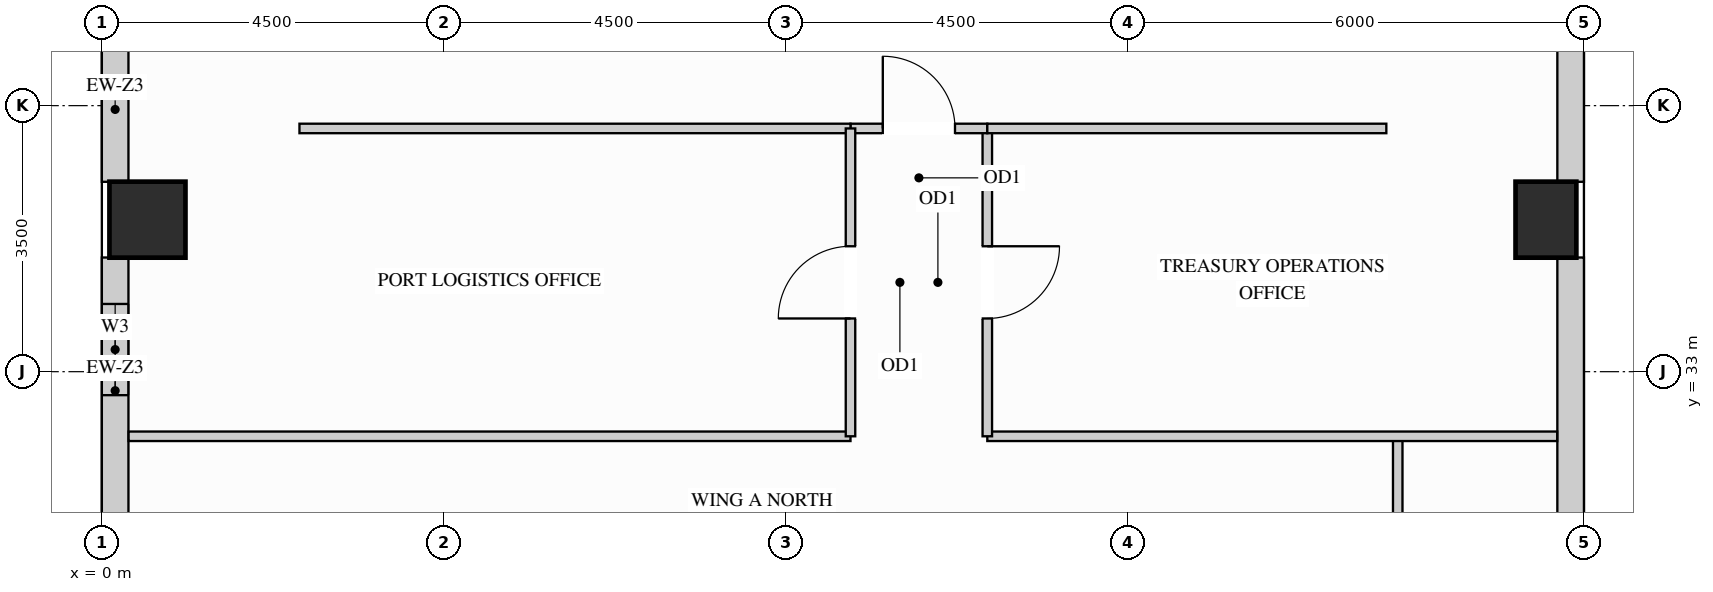
"""IFC4 building model, lengths in metres.
Left out: names, types, materials, properties, quantities, classifications, styles, units other than length and angle.
Written with IfcOpenShell. Run it as: python <this file> out.ifc"""

import sys

from ifc_helpers import new_model, si_unit, direction, frame, frame_2d, origin, origin_2d, place, context, subcontext, project, spatial, rectangle, extrude, source, transform, mapped, element, fill, save


model = new_model("IFC4")
c1 = context("Model", 3, precision=1e-05, world=origin(), true_north=direction((0.0, 1.0)))
c2 = subcontext(c1, "Body", "Model", "MODEL_VIEW")
j1 = project(units=[si_unit("LENGTHUNIT", "METRE"), si_unit("PLANEANGLEUNIT", "RADIAN")], contexts=[c1])
p1 = place(None, origin())
s1 = spatial("IfcSite", under=j1, at=p1, CompositionType="ELEMENT")
p2 = place(p1, origin())
s2 = spatial("IfcBuilding", under=s1, at=p2, CompositionType="ELEMENT")
p3 = place(p2, frame((0.0, 0.0, 164.7)))
s3 = spatial("IfcBuildingStorey", under=s2, at=p3, CompositionType="ELEMENT", Elevation=164.7)
m1 = source(origin(), c2, "Body", "SweptSolid", [
    extrude(rectangle(XDim=0.8, YDim=1.0, at=origin_2d()), origin(), (0.0, 0.0, 1.0), 3.4),
])
p4 = place(p3, frame((19.0, 35.0, 0.0), z_axis=(0.0, 0.0, 1.0), x_axis=(1.0, 0.0, 0.0)))
e1 = element("IfcColumn", 1, at=p4, inside=s3, PredefinedType="COLUMN", context=c2, shape_type="MappedRepresentation", body=[
    mapped(m1, transform((0.0, 0.0, 0.0), x_axis=(1.0, 0.0, 0.0), y_axis=(0.0, 1.0, 0.0), z_axis=(0.0, 0.0, 1.0))),
])
m2 = source(origin(), c2, "Body", "SweptSolid", [
    extrude(rectangle(XDim=1.0, YDim=1.0, at=origin_2d()), origin(), (0.0, 0.0, 1.0), 3.4),
])
p5 = place(p3, frame((0.6, 35.0, 0.0), z_axis=(0.0, 0.0, 1.0), x_axis=(1.0, 0.0, 0.0)))
e2 = element("IfcColumn", 2, at=p5, inside=s3, PredefinedType="COLUMN", context=c2, shape_type="MappedRepresentation", body=[
    mapped(m2, transform((0.0, 0.0, 0.0), x_axis=(1.0, 0.0, 0.0), y_axis=(0.0, 1.0, 0.0), z_axis=(0.0, 0.0, 1.0))),
])
m3 = source(origin(), c2, "Body", "SweptSolid", [
    extrude(rectangle(XDim=1.904, YDim=0.35, at=frame_2d((0.952, 0.0))), origin(), (0.0, 0.0, 1.0), 2.612),
])
p6 = place(p3, frame((0.175, 37.402, 0.0), z_axis=(0.0, 0.0, 1.0), x_axis=(0.0, -1.0, 0.0)))
e3 = element("IfcWall", 3, at=p6, inside=s3, PredefinedType="SOLIDWALL", context=c2, shape_type="MappedRepresentation", body=[
    mapped(m3, transform((0.0, 0.0, 0.0), x_axis=(1.0, 0.0, 0.0), y_axis=(0.0, 1.0, 0.0), z_axis=(0.0, 0.0, 1.0))),
])
p7 = place(p3, frame((0.175, 34.502, 0.0), z_axis=(0.0, 0.0, 1.0), x_axis=(0.0, -1.0, 0.0)))
e4 = element("IfcWall", 4, at=p7, inside=s3, PredefinedType="SOLIDWALL", context=c2, shape_type="SweptSolid", body=[
    extrude(rectangle(XDim=3.504, YDim=0.35, at=frame_2d((1.752, 0.0))), origin(), (0.0, 0.0, 1.0), 2.612),
])
p8 = place(p7, frame((0.611, 0.0, 0.78)))
e5 = element("IfcOpeningElement", 5, at=p8, cuts=e4, PredefinedType="OPENING", context=c2, shape_type="SweptSolid", body=[
    extrude(rectangle(XDim=1.2, YDim=1.652, at=frame_2d((0.6, 0.826))), frame((0.0, 0.185, 0.0), z_axis=(0.0, -1.0, 0.0), x_axis=(1.0, 0.0, 0.0)), (0.0, 0.0, 1.0), 0.37),
])
m4 = source(origin(), c2, "Body", "SweptSolid", [
    extrude(rectangle(XDim=3.504, YDim=0.35, at=frame_2d((1.752, 0.0))), origin(), (0.0, 0.0, 1.0), 2.612),
])
p9 = place(p3, frame((19.325, 30.998, 0.0), z_axis=(0.0, 0.0, 1.0), x_axis=(0.0, 1.0, 0.0)))
e6 = element("IfcWall", 6, at=p9, inside=s3, PredefinedType="SOLIDWALL", context=c2, shape_type="MappedRepresentation", body=[
    mapped(m4, transform((0.0, 0.0, 0.0), x_axis=(1.0, 0.0, 0.0), y_axis=(0.0, 1.0, 0.0), z_axis=(0.0, 0.0, 1.0))),
])
p10 = place(p3, frame((19.325, 35.498, 0.0), z_axis=(0.0, 0.0, 1.0), x_axis=(0.0, 1.0, 0.0)))
e7 = element("IfcWall", 7, at=p10, inside=s3, PredefinedType="SOLIDWALL", context=c2, shape_type="MappedRepresentation", body=[
    mapped(m3, transform((0.0, 0.0, 0.0), x_axis=(1.0, 0.0, 0.0), y_axis=(0.0, 1.0, 0.0), z_axis=(0.0, 0.0, 1.0))),
])
p11 = place(p3, frame((17.05, 26.05, 0.0), z_axis=(0.0, 0.0, 1.0), x_axis=(0.0, 1.0, 0.0)))
e8 = element("IfcWall", 8, at=p11, inside=s3, PredefinedType="PARTITIONING", context=c2, shape_type="SweptSolid", body=[
    extrude(rectangle(XDim=6.1, YDim=0.125, at=frame_2d((3.05, 0.0))), origin(), (0.0, 0.0, 1.0), 3.385),
])
p12 = place(p11, frame((2.575, 0.0, 0.0)))
e9 = element("IfcOpeningElement", 9, at=p12, cuts=e8, PredefinedType="OPENING", context=c2, shape_type="SweptSolid", body=[
    extrude(rectangle(XDim=0.95, YDim=2.15, at=frame_2d((0.475, 1.075))), frame((0.0, 0.073, 0.0), z_axis=(0.0, -1.0, 0.0), x_axis=(1.0, 0.0, 0.0)), (0.0, 0.0, 1.0), 0.145),
])
m5 = source(origin(), c2, "Body", "SweptSolid", [
    extrude(rectangle(XDim=7.498, YDim=0.125, at=frame_2d((3.749, 0.0))), origin(), (0.0, 0.0, 1.0), 3.385),
])
p13 = place(p3, frame((11.65, 32.15, 0.0), z_axis=(0.0, 0.0, 1.0), x_axis=(1.0, 0.0, 0.0)))
e10 = element("IfcWall", 10, at=p13, inside=s3, PredefinedType="PARTITIONING", context=c2, shape_type="MappedRepresentation", body=[
    mapped(m5, transform((0.0, 0.0, 0.0), x_axis=(1.0, 0.0, 0.0), y_axis=(0.0, 1.0, 0.0), z_axis=(0.0, 0.0, 1.0))),
])
m6 = source(origin(), c2, "Body", "SweptSolid", [
    extrude(rectangle(XDim=9.498, YDim=0.125, at=frame_2d((4.749, 0.0))), origin(), (0.0, 0.0, 1.0), 3.385),
])
p14 = place(p3, frame((0.352, 32.15, 0.0), z_axis=(0.0, 0.0, 1.0), x_axis=(1.0, 0.0, 0.0)))
e11 = element("IfcWall", 11, at=p14, inside=s3, PredefinedType="PARTITIONING", context=c2, shape_type="MappedRepresentation", body=[
    mapped(m6, transform((0.0, 0.0, 0.0), x_axis=(1.0, 0.0, 0.0), y_axis=(0.0, 1.0, 0.0), z_axis=(0.0, 0.0, 1.0))),
])
p15 = place(p3, frame((11.65, 32.15, 0.0), z_axis=(0.0, 0.0, 1.0), x_axis=(0.0, 1.0, 0.0)))
e12 = element("IfcWall", 12, at=p15, inside=s3, PredefinedType="PARTITIONING", context=c2, shape_type="SweptSolid", body=[
    extrude(rectangle(XDim=4.05, YDim=0.125, at=frame_2d((2.025, 0.0))), origin(), (0.0, 0.0, 1.0), 3.385),
])
p16 = place(p15, frame((1.55, 0.0, 0.0)))
e13 = element("IfcOpeningElement", 13, at=p16, cuts=e12, PredefinedType="OPENING", context=c2, shape_type="SweptSolid", body=[
    extrude(rectangle(XDim=0.95, YDim=2.15, at=frame_2d((0.475, 1.075))), frame((0.0, 0.073, 0.0), z_axis=(0.0, -1.0, 0.0), x_axis=(1.0, 0.0, 0.0)), (0.0, 0.0, 1.0), 0.145),
])
p17 = place(p3, frame((9.85, 36.2, 0.0), z_axis=(0.0, 0.0, 1.0), x_axis=(1.0, 0.0, 0.0)))
e14 = element("IfcWall", 14, at=p17, inside=s3, PredefinedType="PARTITIONING", context=c2, shape_type="SweptSolid", body=[
    extrude(rectangle(XDim=1.8, YDim=0.125, at=frame_2d((0.9, 0.0))), origin(), (0.0, 0.0, 1.0), 2.848),
])
p18 = place(p17, frame((0.425, 0.0, 0.0)))
e15 = element("IfcOpeningElement", 15, at=p18, cuts=e14, PredefinedType="OPENING", context=c2, shape_type="SweptSolid", body=[
    extrude(rectangle(XDim=0.95, YDim=2.15, at=frame_2d((0.475, 1.075))), frame((0.0, 0.073, 0.0), z_axis=(0.0, -1.0, 0.0), x_axis=(1.0, 0.0, 0.0)), (0.0, 0.0, 1.0), 0.145),
])
m7 = source(origin(), c2, "Body", "SweptSolid", [
    extrude(rectangle(XDim=5.25, YDim=0.125, at=frame_2d((2.625, 0.0))), origin(), (0.0, 0.0, 1.0), 2.848),
])
p19 = place(p3, frame((11.65, 36.2, 0.0), z_axis=(0.0, 0.0, 1.0), x_axis=(1.0, 0.0, 0.0)))
e16 = element("IfcWall", 16, at=p19, inside=s3, PredefinedType="PARTITIONING", context=c2, shape_type="MappedRepresentation", body=[
    mapped(m7, transform((0.0, 0.0, 0.0), x_axis=(1.0, 0.0, 0.0), y_axis=(0.0, 1.0, 0.0), z_axis=(0.0, 0.0, 1.0))),
])
m8 = source(origin(), c2, "Body", "SweptSolid", [
    extrude(rectangle(XDim=7.25, YDim=0.125, at=frame_2d((3.625, 0.0))), origin(), (0.0, 0.0, 1.0), 2.848),
])
p20 = place(p3, frame((2.6, 36.2, 0.0), z_axis=(0.0, 0.0, 1.0), x_axis=(1.0, 0.0, 0.0)))
e17 = element("IfcWall", 17, at=p20, inside=s3, PredefinedType="PARTITIONING", context=c2, shape_type="MappedRepresentation", body=[
    mapped(m8, transform((0.0, 0.0, 0.0), x_axis=(1.0, 0.0, 0.0), y_axis=(0.0, 1.0, 0.0), z_axis=(0.0, 0.0, 1.0))),
])
p21 = place(p3, frame((9.85, 32.15, 0.0), z_axis=(0.0, 0.0, 1.0), x_axis=(0.0, 1.0, 0.0)))
e18 = element("IfcWall", 18, at=p21, inside=s3, PredefinedType="PARTITIONING", context=c2, shape_type="SweptSolid", body=[
    extrude(rectangle(XDim=4.05, YDim=0.125, at=frame_2d((2.025, 0.0))), origin(), (0.0, 0.0, 1.0), 3.385),
])
p22 = place(p21, frame((1.55, 0.0, 0.0)))
e19 = element("IfcOpeningElement", 19, at=p22, cuts=e18, PredefinedType="OPENING", context=c2, shape_type="SweptSolid", body=[
    extrude(rectangle(XDim=0.95, YDim=2.15, at=frame_2d((0.475, 1.075))), frame((0.0, 0.073, 0.0), z_axis=(0.0, -1.0, 0.0), x_axis=(1.0, 0.0, 0.0)), (0.0, 0.0, 1.0), 0.145),
])
m9 = source(origin(), c2, "Body", "SweptSolid", [
    extrude(rectangle(XDim=0.95, YDim=2.15, at=frame_2d((0.475, 1.075))), frame((0.0, 0.025, 0.0), z_axis=(0.0, -1.0, 0.0), x_axis=(1.0, 0.0, 0.0)), (0.0, 0.0, 1.0), 0.05),
])
p23 = place(p16, origin())
e20 = element("IfcDoor", 20, at=p23, inside=s3, OperationType="SINGLE_SWING_RIGHT", PredefinedType="DOOR", context=c2, shape_type="MappedRepresentation", body=[
    mapped(m9, transform((0.0, 0.0, 0.0), x_axis=(1.0, 0.0, 0.0), y_axis=(0.0, 1.0, 0.0), z_axis=(0.0, 0.0, 1.0))),
])
fill(e13, e20)
p24 = place(p18, origin())
e21 = element("IfcDoor", 21, at=p24, inside=s3, OperationType="SINGLE_SWING_LEFT", PredefinedType="DOOR", context=c2, shape_type="MappedRepresentation", body=[
    mapped(m9, transform((0.0, 0.0, 0.0), x_axis=(1.0, 0.0, 0.0), y_axis=(0.0, 1.0, 0.0), z_axis=(0.0, 0.0, 1.0))),
])
fill(e15, e21)
p25 = place(p22, origin())
e22 = element("IfcDoor", 22, at=p25, inside=s3, OperationType="SINGLE_SWING_LEFT", PredefinedType="DOOR", context=c2, shape_type="MappedRepresentation", body=[
    mapped(m9, transform((0.0, 0.0, 0.0), x_axis=(1.0, 0.0, 0.0), y_axis=(0.0, 1.0, 0.0), z_axis=(0.0, 0.0, 1.0))),
])
fill(e19, e22)
m10 = source(origin(), c2, "Body", "SweptSolid", [
    extrude(rectangle(XDim=1.2, YDim=1.652, at=frame_2d((0.6, 0.826))), frame((0.0, 0.03, 0.0), z_axis=(0.0, -1.0, 0.0), x_axis=(1.0, 0.0, 0.0)), (0.0, 0.0, 1.0), 0.06),
])
p26 = place(p8, origin())
e23 = element("IfcWindow", 23, at=p26, inside=s3, PartitioningType="SINGLE_PANEL", PredefinedType="WINDOW", context=c2, shape_type="MappedRepresentation", body=[
    mapped(m10, transform((0.0, 0.0, 0.0), x_axis=(1.0, 0.0, 0.0), y_axis=(0.0, 1.0, 0.0), z_axis=(0.0, 0.0, 1.0))),
])
fill(e5, e23)
save(model, sys.argv[1])
